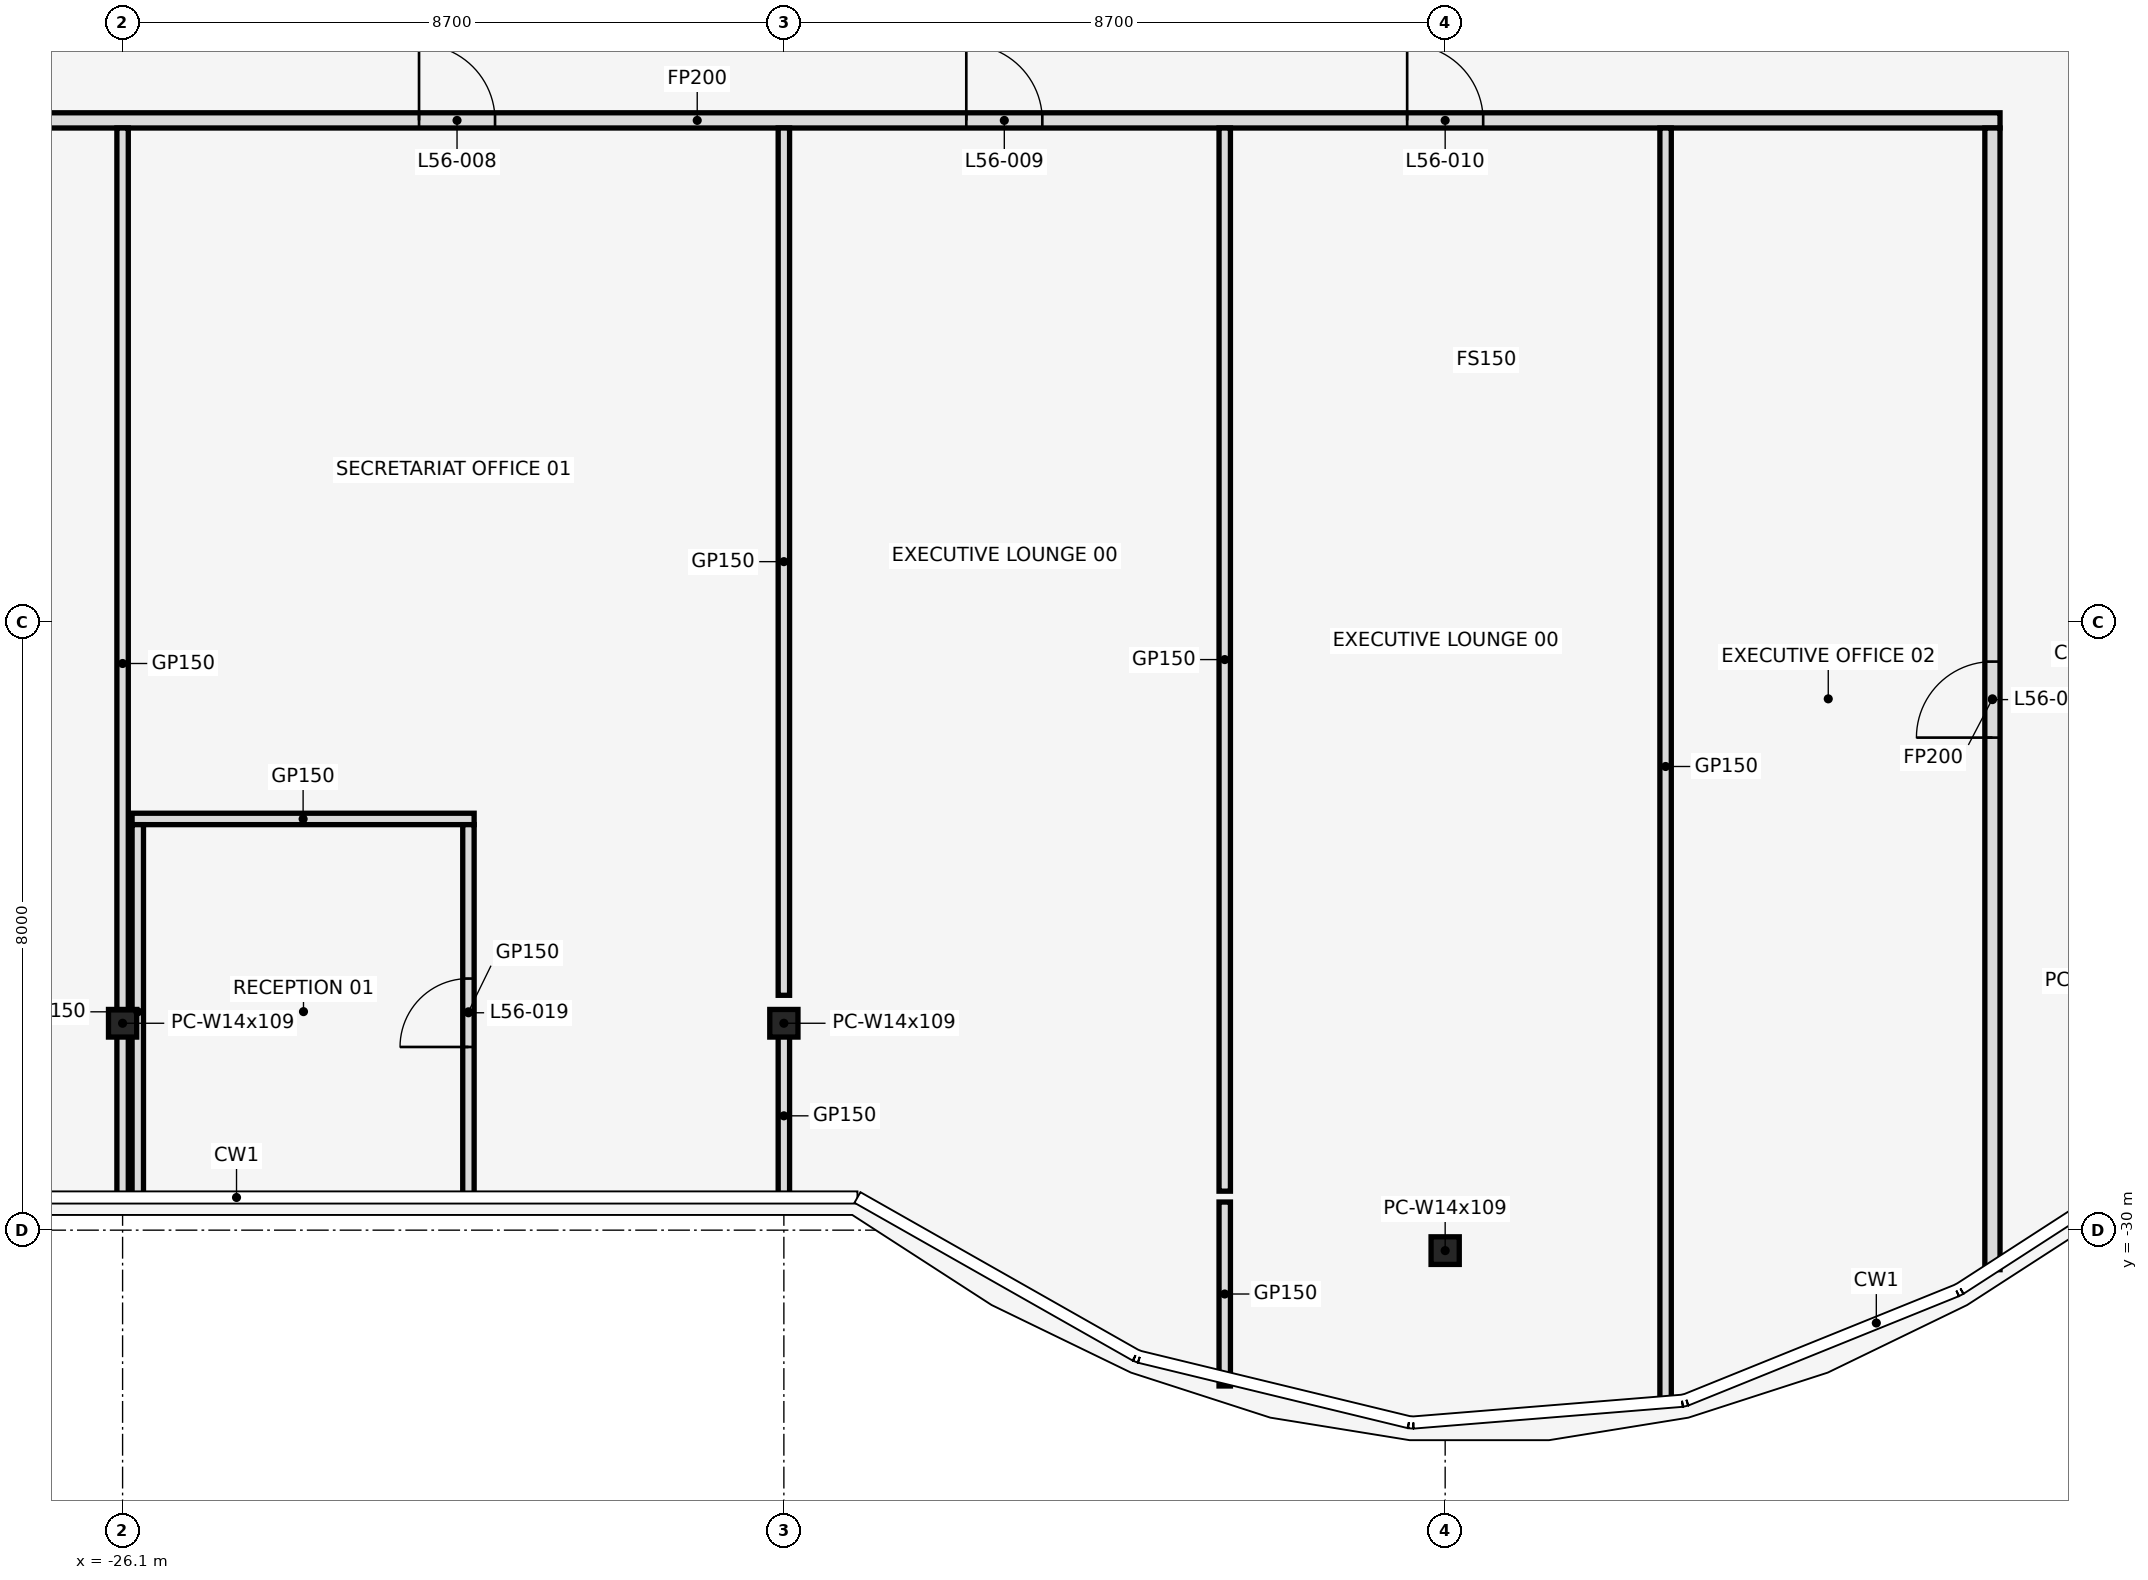
"""IFC4 building model, lengths in metres.
Left out: names, types, materials, properties, quantities, classifications, styles, units other than length and angle.
Written with IfcOpenShell. Run it as: python <this file> out.ifc"""

import sys

from ifc_helpers import new_model, si_unit, direction, frame, frame_2d, origin, origin_2d, place, context, subcontext, project, spatial, rectangle, i_section, extrude, element, fill, save


model = new_model("IFC4")
c1 = context("Model", 3, precision=1e-05, world=origin(), true_north=direction((0.0, 1.0)))
c2 = subcontext(c1, "Body", "Model", "MODEL_VIEW")
j1 = project(units=[si_unit("LENGTHUNIT", "METRE"), si_unit("PLANEANGLEUNIT", "RADIAN")], contexts=[c1])
p1 = place(None, origin())
s1 = spatial("IfcSite", under=j1, at=p1, CompositionType="ELEMENT")
p2 = place(p1, origin())
s2 = spatial("IfcBuilding", under=s1, at=p2, CompositionType="ELEMENT")
p3 = place(p2, frame((0.0, 0.0, 249.8)))
s3 = spatial("IfcBuildingStorey", under=s2, at=p3, CompositionType="ELEMENT", Elevation=249.8)
for number, where, z_axis, x_axis in (
    (1, (-26.1, -27.278, 0.0), (0.0, 0.0, 1.0), (1.0, 0.0, 0.0)),
    (2, (-17.4, -27.278, 0.0), (0.0, 0.0, 1.0), (1.0, 0.0, 0.0)),
    (3, (-8.7, -30.269, 0.0), (0.0, 0.0, 1.0), (1.0, 0.0, 0.0)),
):
    element("IfcColumn", number, at=place(p3, frame(where, z_axis=z_axis, x_axis=x_axis)), inside=s3, PredefinedType="COLUMN", context=c2, shape_type="SweptSolid", body=[
        extrude(i_section(OverallWidth=0.371, OverallDepth=0.363, WebThickness=0.013, FlangeThickness=0.022, at=origin_2d()), origin(), (0.0, 0.0, 1.0), 4.2),
    ])
p4 = place(p3, frame((-25.975, -24.59, 0.0), z_axis=(0.0, 0.0, 1.0), x_axis=(1.0, 0.0, 0.0)))
e4 = element("IfcWall", 4, at=p4, inside=s3, PredefinedType="PARTITIONING", context=c2, shape_type="SweptSolid", body=[
    extrude(rectangle(XDim=4.5, YDim=0.15, at=frame_2d((2.25, 0.0))), origin(), (0.0, 0.0, 1.0), 3.039),
])
p5 = place(p3, frame((-35.68, -15.4, 0.0), z_axis=(0.0, 0.0, 1.0), x_axis=(1.0, 0.0, 0.0)))
e5 = element("IfcWall", 5, at=p5, inside=s3, PredefinedType="PARTITIONING", context=c2, shape_type="SweptSolid", body=[
    extrude(rectangle(XDim=34.28, YDim=0.2, at=frame_2d((17.14, 0.0))), origin(), (0.0, 0.0, 1.0), 3.039),
])
p6 = place(p5, frame((4.3, 0.0, 0.0)))
e6 = element("IfcOpeningElement", 6, at=p6, cuts=e5, PredefinedType="OPENING", context=c2, shape_type="SweptSolid", body=[
    extrude(rectangle(XDim=1.0, YDim=2.1, at=frame_2d((0.5, 1.05))), frame((0.0, 0.112, 0.0), z_axis=(0.0, -1.0, 0.0), x_axis=(1.0, 0.0, 0.0)), (0.0, 0.0, 1.0), 0.224),
])
p7 = place(p5, frame((13.48, 0.0, 0.0)))
e7 = element("IfcOpeningElement", 7, at=p7, cuts=e5, PredefinedType="OPENING", context=c2, shape_type="SweptSolid", body=[
    extrude(rectangle(XDim=1.0, YDim=2.1, at=frame_2d((0.5, 1.05))), frame((0.0, 0.112, 0.0), z_axis=(0.0, -1.0, 0.0), x_axis=(1.0, 0.0, 0.0)), (0.0, 0.0, 1.0), 0.224),
])
p8 = place(p5, frame((20.68, 0.0, 0.0)))
e8 = element("IfcOpeningElement", 8, at=p8, cuts=e5, PredefinedType="OPENING", context=c2, shape_type="SweptSolid", body=[
    extrude(rectangle(XDim=1.0, YDim=2.1, at=frame_2d((0.5, 1.05))), frame((0.0, 0.112, 0.0), z_axis=(0.0, -1.0, 0.0), x_axis=(1.0, 0.0, 0.0)), (0.0, 0.0, 1.0), 0.224),
])
p9 = place(p5, frame((26.48, 0.0, 0.0)))
e9 = element("IfcOpeningElement", 9, at=p9, cuts=e5, PredefinedType="OPENING", context=c2, shape_type="SweptSolid", body=[
    extrude(rectangle(XDim=1.0, YDim=2.1, at=frame_2d((0.5, 1.05))), frame((0.0, 0.112, 0.0), z_axis=(0.0, -1.0, 0.0), x_axis=(1.0, 0.0, 0.0)), (0.0, 0.0, 1.0), 0.224),
])
p10 = place(p3, frame((-26.1, -29.59, 0.0), z_axis=(0.0, 0.0, 1.0), x_axis=(0.0, 1.0, 0.0)))
e10 = element("IfcWall", 10, at=p10, inside=s3, PredefinedType="PARTITIONING", context=c2, shape_type="SweptSolid", body=[
    extrude(rectangle(XDim=14.09, YDim=0.15, at=frame_2d((7.045, 0.0))), origin(), (0.0, 0.0, 1.0), 3.039),
])
p11 = place(p3, frame((-25.9, -29.59, 0.0), z_axis=(0.0, 0.0, 1.0), x_axis=(0.0, 1.0, 0.0)))
e11 = element("IfcWall", 11, at=p11, inside=s3, PredefinedType="PARTITIONING", context=c2, shape_type="SweptSolid", body=[
    extrude(rectangle(XDim=4.925, YDim=0.15, at=frame_2d((2.462, 0.0))), origin(), (0.0, 0.0, 1.0), 3.039),
])
p12 = place(p3, frame((-21.55, -29.59, 0.0), z_axis=(0.0, 0.0, 1.0), x_axis=(0.0, 1.0, 0.0)))
e12 = element("IfcWall", 12, at=p12, inside=s3, PredefinedType="PARTITIONING", context=c2, shape_type="SweptSolid", body=[
    extrude(rectangle(XDim=4.925, YDim=0.15, at=frame_2d((2.462, 0.0))), origin(), (0.0, 0.0, 1.0), 3.039),
])
p13 = place(p12, frame((2.0, 0.0, 0.0)))
e13 = element("IfcOpeningElement", 13, at=p13, cuts=e12, PredefinedType="OPENING", context=c2, shape_type="SweptSolid", body=[
    extrude(rectangle(XDim=0.9, YDim=2.1, at=frame_2d((0.45, 1.05))), frame((0.0, 0.087, 0.0), z_axis=(0.0, -1.0, 0.0), x_axis=(1.0, 0.0, 0.0)), (0.0, 0.0, 1.0), 0.174),
])
p14 = place(p3, frame((-17.4, -29.59, 0.0), z_axis=(0.0, 0.0, 1.0), x_axis=(0.0, 1.0, 0.0)))
e14 = element("IfcWall", 14, at=p14, inside=s3, PredefinedType="PARTITIONING", context=c2, shape_type="SweptSolid", body=[
    extrude(rectangle(XDim=2.188, YDim=0.15, at=frame_2d((1.094, 0.0))), origin(), (0.0, 0.0, 1.0), 3.039),
])
p15 = place(p3, frame((-17.4, -26.91, 0.0), z_axis=(0.0, 0.0, 1.0), x_axis=(0.0, 1.0, 0.0)))
e15 = element("IfcWall", 15, at=p15, inside=s3, PredefinedType="PARTITIONING", context=c2, shape_type="SweptSolid", body=[
    extrude(rectangle(XDim=11.41, YDim=0.15, at=frame_2d((5.705, 0.0))), origin(), (0.0, 0.0, 1.0), 3.039),
])
p16 = place(p3, frame((-11.6, -32.05, 0.0), z_axis=(0.0, 0.0, 1.0), x_axis=(0.0, 1.0, 0.0)))
e16 = element("IfcWall", 16, at=p16, inside=s3, PredefinedType="PARTITIONING", context=c2, shape_type="SweptSolid", body=[
    extrude(rectangle(XDim=2.42, YDim=0.15, at=frame_2d((1.21, 0.0))), origin(), (0.0, 0.0, 1.0), 3.039),
])
p17 = place(p3, frame((-11.6, -29.487, 0.0), z_axis=(0.0, 0.0, 1.0), x_axis=(0.0, 1.0, 0.0)))
e17 = element("IfcWall", 17, at=p17, inside=s3, PredefinedType="PARTITIONING", context=c2, shape_type="SweptSolid", body=[
    extrude(rectangle(XDim=13.987, YDim=0.15, at=frame_2d((6.994, 0.0))), origin(), (0.0, 0.0, 1.0), 3.039),
])
p18 = place(p3, frame((-5.8, -32.3, 0.0), z_axis=(0.0, 0.0, 1.0), x_axis=(0.0, 1.0, 0.0)))
e18 = element("IfcWall", 18, at=p18, inside=s3, PredefinedType="PARTITIONING", context=c2, shape_type="SweptSolid", body=[
    extrude(rectangle(XDim=16.8, YDim=0.15, at=frame_2d((8.4, 0.0))), origin(), (0.0, 0.0, 1.0), 3.039),
])
p19 = place(p3, frame((-1.5, -30.52, 0.0), z_axis=(0.0, 0.0, 1.0), x_axis=(0.0, 1.0, 0.0)))
e19 = element("IfcWall", 19, at=p19, inside=s3, PredefinedType="PARTITIONING", context=c2, shape_type="SweptSolid", body=[
    extrude(rectangle(XDim=15.02, YDim=0.2, at=frame_2d((7.51, 0.0))), origin(), (0.0, 0.0, 1.0), 3.039),
])
p20 = place(p19, frame((7.0, 0.0, 0.0)))
e20 = element("IfcOpeningElement", 20, at=p20, cuts=e19, PredefinedType="OPENING", context=c2, shape_type="SweptSolid", body=[
    extrude(rectangle(XDim=1.0, YDim=2.1, at=frame_2d((0.5, 1.05))), frame((0.0, 0.112, 0.0), z_axis=(0.0, -1.0, 0.0), x_axis=(1.0, 0.0, 0.0)), (0.0, 0.0, 1.0), 0.224),
])
p21 = place(p7, frame((1.0, 0.0, 0.0), z_axis=(0.0, 0.0, 1.0), x_axis=(-1.0, 0.0, 0.0)))
e21 = element("IfcDoor", 21, at=p21, inside=s3, OperationType="SINGLE_SWING_RIGHT", PredefinedType="DOOR", context=c2, shape_type="SweptSolid", body=[
    extrude(rectangle(XDim=1.0, YDim=2.1, at=frame_2d((0.5, 1.05))), frame((0.0, 0.025, 0.0), z_axis=(0.0, -1.0, 0.0), x_axis=(1.0, 0.0, 0.0)), (0.0, 0.0, 1.0), 0.05),
])
fill(e7, e21)
p22 = place(p8, frame((1.0, 0.0, 0.0), z_axis=(0.0, 0.0, 1.0), x_axis=(-1.0, 0.0, 0.0)))
e22 = element("IfcDoor", 22, at=p22, inside=s3, OperationType="SINGLE_SWING_RIGHT", PredefinedType="DOOR", context=c2, shape_type="SweptSolid", body=[
    extrude(rectangle(XDim=1.0, YDim=2.1, at=frame_2d((0.5, 1.05))), frame((0.0, 0.025, 0.0), z_axis=(0.0, -1.0, 0.0), x_axis=(1.0, 0.0, 0.0)), (0.0, 0.0, 1.0), 0.05),
])
fill(e8, e22)
p23 = place(p9, frame((1.0, 0.0, 0.0), z_axis=(0.0, 0.0, 1.0), x_axis=(-1.0, 0.0, 0.0)))
e23 = element("IfcDoor", 23, at=p23, inside=s3, OperationType="SINGLE_SWING_LEFT", PredefinedType="DOOR", context=c2, shape_type="SweptSolid", body=[
    extrude(rectangle(XDim=1.0, YDim=2.1, at=frame_2d((0.5, 1.05))), frame((0.0, 0.025, 0.0), z_axis=(0.0, -1.0, 0.0), x_axis=(1.0, 0.0, 0.0)), (0.0, 0.0, 1.0), 0.05),
])
fill(e9, e23)
p24 = place(p20, origin())
e24 = element("IfcDoor", 24, at=p24, inside=s3, OperationType="SINGLE_SWING_LEFT", PredefinedType="DOOR", context=c2, shape_type="SweptSolid", body=[
    extrude(rectangle(XDim=1.0, YDim=2.1, at=frame_2d((0.5, 1.05))), frame((0.0, 0.025, 0.0), z_axis=(0.0, -1.0, 0.0), x_axis=(1.0, 0.0, 0.0)), (0.0, 0.0, 1.0), 0.05),
])
fill(e20, e24)
p25 = place(p13, origin())
e25 = element("IfcDoor", 25, at=p25, inside=s3, OperationType="SINGLE_SWING_LEFT", PredefinedType="DOOR", context=c2, shape_type="SweptSolid", body=[
    extrude(rectangle(XDim=0.9, YDim=2.1, at=frame_2d((0.45, 1.05))), frame((0.0, 0.025, 0.0), z_axis=(0.0, -1.0, 0.0), x_axis=(1.0, 0.0, 0.0)), (0.0, 0.0, 1.0), 0.05),
])
fill(e13, e25)
save(model, sys.argv[1])
